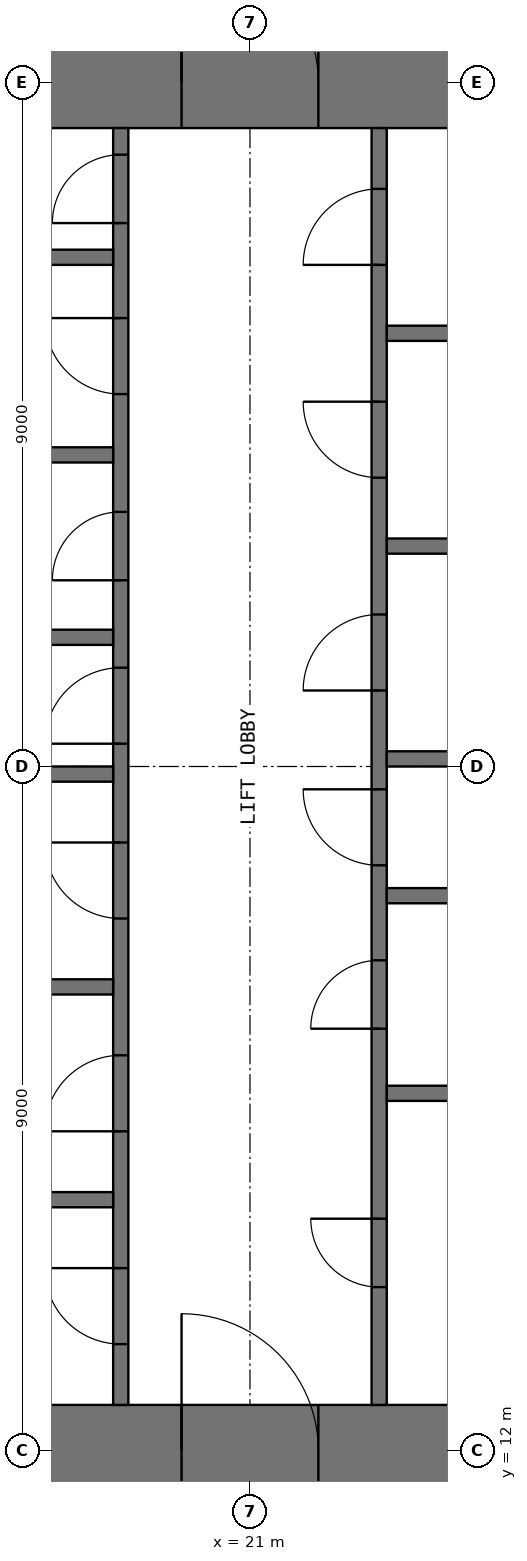
"""IFC4 building model, lengths in metres.
Left out: names, types, materials, properties, quantities, classifications, styles, units other than length and angle.
Written with IfcOpenShell. Run it as: python <this file> out.ifc"""

import sys

from ifc_helpers import new_model, si_unit, direction, frame, frame_2d, origin, place, context, subcontext, project, spatial, rectangle, extrude, element, fill, save


model = new_model("IFC4")
c1 = context("Model", 3, precision=1e-05, world=origin(), true_north=direction((0.0, 1.0)))
c2 = subcontext(c1, "Body", "Model", "MODEL_VIEW")
j1 = project(units=[si_unit("LENGTHUNIT", "METRE"), si_unit("PLANEANGLEUNIT", "RADIAN")], contexts=[c1])
p1 = place(None, origin())
s1 = spatial("IfcSite", under=j1, at=p1, CompositionType="ELEMENT")
p2 = place(p1, origin())
s2 = spatial("IfcBuilding", under=s1, at=p2, CompositionType="ELEMENT")
p3 = place(p2, frame((0.0, 0.0, 283.9)))
s3 = spatial("IfcBuildingStorey", under=s2, at=p3, CompositionType="ELEMENT", Elevation=283.9)
p4 = place(p3, frame((11.4, 12.0, -0.1), z_axis=(0.0, 0.0, 1.0), x_axis=(1.0, 0.0, 0.0)))
e1 = element("IfcWall", 1, at=p4, inside=s3, PredefinedType="SHEAR", context=c2, shape_type="SweptSolid", body=[
    extrude(rectangle(XDim=19.2, YDim=1.2, at=frame_2d((9.6, 0.0))), origin(), (0.0, 0.0, 1.0), 5.95),
])
p5 = place(p4, frame((8.7, 0.0, 0.1)))
e2 = element("IfcOpeningElement", 2, at=p5, cuts=e1, PredefinedType="OPENING", context=c2, shape_type="SweptSolid", body=[
    extrude(rectangle(XDim=1.8, YDim=2.4, at=frame_2d((0.9, 1.2))), frame((0.0, 0.61, 0.0), z_axis=(0.0, -1.0, 0.0), x_axis=(1.0, 0.0, 0.0)), (0.0, 0.0, 1.0), 1.22),
])
p6 = place(p3, frame((11.4, 30.0, -0.1), z_axis=(0.0, 0.0, 1.0), x_axis=(1.0, 0.0, 0.0)))
e3 = element("IfcWall", 3, at=p6, inside=s3, PredefinedType="SHEAR", context=c2, shape_type="SweptSolid", body=[
    extrude(rectangle(XDim=19.2, YDim=1.2, at=frame_2d((9.6, 0.0))), origin(), (0.0, 0.0, 1.0), 5.95),
])
p7 = place(p6, frame((8.7, 0.0, 0.1)))
e4 = element("IfcOpeningElement", 4, at=p7, cuts=e3, PredefinedType="OPENING", context=c2, shape_type="SweptSolid", body=[
    extrude(rectangle(XDim=1.8, YDim=2.4, at=frame_2d((0.9, 1.2))), frame((0.0, 0.61, 0.0), z_axis=(0.0, -1.0, 0.0), x_axis=(1.0, 0.0, 0.0)), (0.0, 0.0, 1.0), 1.22),
])
p8 = place(p3, frame((19.3, 12.6, -0.1), z_axis=(0.0, 0.0, 1.0), x_axis=(0.0, 1.0, 0.0)))
e5 = element("IfcWall", 5, at=p8, inside=s3, PredefinedType="SHEAR", context=c2, shape_type="SweptSolid", body=[
    extrude(rectangle(XDim=16.8, YDim=0.2, at=frame_2d((8.4, 0.0))), origin(), (0.0, 0.0, 1.0), 5.95),
])
p9 = place(p8, frame((8.7, 0.0, 0.1)))
e6 = element("IfcOpeningElement", 6, at=p9, cuts=e5, PredefinedType="OPENING", context=c2, shape_type="SweptSolid", body=[
    extrude(rectangle(XDim=1.0, YDim=2.2, at=frame_2d((0.5, 1.1))), frame((0.0, 0.11, 0.0), z_axis=(0.0, -1.0, 0.0), x_axis=(1.0, 0.0, 0.0)), (0.0, 0.0, 1.0), 0.22),
])
p10 = place(p8, frame((10.85, 0.0, 0.1)))
e7 = element("IfcOpeningElement", 7, at=p10, cuts=e5, PredefinedType="OPENING", context=c2, shape_type="SweptSolid", body=[
    extrude(rectangle(XDim=0.9, YDim=2.2, at=frame_2d((0.45, 1.1))), frame((0.0, 0.11, 0.0), z_axis=(0.0, -1.0, 0.0), x_axis=(1.0, 0.0, 0.0)), (0.0, 0.0, 1.0), 0.22),
])
p11 = place(p8, frame((13.3, 0.0, 0.1)))
e8 = element("IfcOpeningElement", 8, at=p11, cuts=e5, PredefinedType="OPENING", context=c2, shape_type="SweptSolid", body=[
    extrude(rectangle(XDim=1.0, YDim=2.2, at=frame_2d((0.5, 1.1))), frame((0.0, 0.11, 0.0), z_axis=(0.0, -1.0, 0.0), x_axis=(1.0, 0.0, 0.0)), (0.0, 0.0, 1.0), 0.22),
])
p12 = place(p8, frame((15.55, 0.0, 0.1)))
e9 = element("IfcOpeningElement", 9, at=p12, cuts=e5, PredefinedType="OPENING", context=c2, shape_type="SweptSolid", body=[
    extrude(rectangle(XDim=0.9, YDim=2.2, at=frame_2d((0.45, 1.1))), frame((0.0, 0.11, 0.0), z_axis=(0.0, -1.0, 0.0), x_axis=(1.0, 0.0, 0.0)), (0.0, 0.0, 1.0), 0.22),
])
p13 = place(p8, frame((0.8, 0.0, 0.1)))
e10 = element("IfcOpeningElement", 10, at=p13, cuts=e5, PredefinedType="OPENING", context=c2, shape_type="SweptSolid", body=[
    extrude(rectangle(XDim=1.0, YDim=2.2, at=frame_2d((0.5, 1.1))), frame((0.0, 0.11, 0.0), z_axis=(0.0, -1.0, 0.0), x_axis=(1.0, 0.0, 0.0)), (0.0, 0.0, 1.0), 0.22),
])
p14 = place(p8, frame((3.6, 0.0, 0.1)))
e11 = element("IfcOpeningElement", 11, at=p14, cuts=e5, PredefinedType="OPENING", context=c2, shape_type="SweptSolid", body=[
    extrude(rectangle(XDim=1.0, YDim=2.2, at=frame_2d((0.5, 1.1))), frame((0.0, 0.11, 0.0), z_axis=(0.0, -1.0, 0.0), x_axis=(1.0, 0.0, 0.0)), (0.0, 0.0, 1.0), 0.22),
])
p15 = place(p8, frame((6.4, 0.0, 0.1)))
e12 = element("IfcOpeningElement", 12, at=p15, cuts=e5, PredefinedType="OPENING", context=c2, shape_type="SweptSolid", body=[
    extrude(rectangle(XDim=1.0, YDim=2.2, at=frame_2d((0.5, 1.1))), frame((0.0, 0.11, 0.0), z_axis=(0.0, -1.0, 0.0), x_axis=(1.0, 0.0, 0.0)), (0.0, 0.0, 1.0), 0.22),
])
p16 = place(p3, frame((22.7, 12.6, -0.1), z_axis=(0.0, 0.0, 1.0), x_axis=(0.0, 1.0, 0.0)))
e13 = element("IfcWall", 13, at=p16, inside=s3, PredefinedType="SHEAR", context=c2, shape_type="SweptSolid", body=[
    extrude(rectangle(XDim=16.8, YDim=0.2, at=frame_2d((8.4, 0.0))), origin(), (0.0, 0.0, 1.0), 5.95),
])
p17 = place(p16, frame((7.1, 0.0, 0.1)))
e14 = element("IfcOpeningElement", 14, at=p17, cuts=e13, PredefinedType="OPENING", context=c2, shape_type="SweptSolid", body=[
    extrude(rectangle(XDim=1.0, YDim=2.2, at=frame_2d((0.5, 1.1))), frame((0.0, 0.11, 0.0), z_axis=(0.0, -1.0, 0.0), x_axis=(1.0, 0.0, 0.0)), (0.0, 0.0, 1.0), 0.22),
])
p18 = place(p16, frame((1.55, 0.0, 0.1)))
e15 = element("IfcOpeningElement", 15, at=p18, cuts=e13, PredefinedType="OPENING", context=c2, shape_type="SweptSolid", body=[
    extrude(rectangle(XDim=0.9, YDim=2.2, at=frame_2d((0.45, 1.1))), frame((0.0, 0.11, 0.0), z_axis=(0.0, -1.0, 0.0), x_axis=(1.0, 0.0, 0.0)), (0.0, 0.0, 1.0), 0.22),
])
p19 = place(p16, frame((4.95, 0.0, 0.1)))
e16 = element("IfcOpeningElement", 16, at=p19, cuts=e13, PredefinedType="OPENING", context=c2, shape_type="SweptSolid", body=[
    extrude(rectangle(XDim=0.9, YDim=2.2, at=frame_2d((0.45, 1.1))), frame((0.0, 0.11, 0.0), z_axis=(0.0, -1.0, 0.0), x_axis=(1.0, 0.0, 0.0)), (0.0, 0.0, 1.0), 0.22),
])
p20 = place(p16, frame((9.4, 0.0, 0.1)))
e17 = element("IfcOpeningElement", 17, at=p20, cuts=e13, PredefinedType="OPENING", context=c2, shape_type="SweptSolid", body=[
    extrude(rectangle(XDim=1.0, YDim=2.2, at=frame_2d((0.5, 1.1))), frame((0.0, 0.11, 0.0), z_axis=(0.0, -1.0, 0.0), x_axis=(1.0, 0.0, 0.0)), (0.0, 0.0, 1.0), 0.22),
])
p21 = place(p16, frame((12.2, 0.0, 0.1)))
e18 = element("IfcOpeningElement", 18, at=p21, cuts=e13, PredefinedType="OPENING", context=c2, shape_type="SweptSolid", body=[
    extrude(rectangle(XDim=1.0, YDim=2.2, at=frame_2d((0.5, 1.1))), frame((0.0, 0.11, 0.0), z_axis=(0.0, -1.0, 0.0), x_axis=(1.0, 0.0, 0.0)), (0.0, 0.0, 1.0), 0.22),
])
p22 = place(p16, frame((15.0, 0.0, 0.1)))
e19 = element("IfcOpeningElement", 19, at=p22, cuts=e13, PredefinedType="OPENING", context=c2, shape_type="SweptSolid", body=[
    extrude(rectangle(XDim=1.0, YDim=2.2, at=frame_2d((0.5, 1.1))), frame((0.0, 0.11, 0.0), z_axis=(0.0, -1.0, 0.0), x_axis=(1.0, 0.0, 0.0)), (0.0, 0.0, 1.0), 0.22),
])
for number, where, z_axis, x_axis in (
    (20, (16.0, 15.3, -0.1), (0.0, 0.0, 1.0), (1.0, 0.0, 0.0)),
    (21, (16.0, 18.1, -0.1), (0.0, 0.0, 1.0), (1.0, 0.0, 0.0)),
    (22, (16.0, 20.9, -0.1), (0.0, 0.0, 1.0), (1.0, 0.0, 0.0)),
    (23, (16.0, 22.7, -0.1), (0.0, 0.0, 1.0), (1.0, 0.0, 0.0)),
    (24, (16.0, 25.1, -0.1), (0.0, 0.0, 1.0), (1.0, 0.0, 0.0)),
    (25, (16.0, 27.7, -0.1), (0.0, 0.0, 1.0), (1.0, 0.0, 0.0)),
    (26, (22.8, 16.7, -0.1), (0.0, 0.0, 1.0), (1.0, 0.0, 0.0)),
    (27, (22.8, 19.3, -0.1), (0.0, 0.0, 1.0), (1.0, 0.0, 0.0)),
    (28, (22.8, 21.1, -0.1), (0.0, 0.0, 1.0), (1.0, 0.0, 0.0)),
    (29, (22.8, 23.9, -0.1), (0.0, 0.0, 1.0), (1.0, 0.0, 0.0)),
    (30, (22.8, 26.7, -0.1), (0.0, 0.0, 1.0), (1.0, 0.0, 0.0)),
):
    element("IfcWall", number, at=place(p3, frame(where, z_axis=z_axis, x_axis=x_axis)), inside=s3, PredefinedType="SHEAR", context=c2, shape_type="SweptSolid", body=[
        extrude(rectangle(XDim=3.2, YDim=0.2, at=frame_2d((1.6, 0.0))), origin(), (0.0, 0.0, 1.0), 5.95),
    ])
p23 = place(p5, origin())
e31 = element("IfcDoor", 31, at=p23, inside=s3, OperationType="DOUBLE_DOOR_SINGLE_SWING", PredefinedType="DOOR", context=c2, shape_type="SweptSolid", body=[
    extrude(rectangle(XDim=1.8, YDim=2.4, at=frame_2d((0.9, 1.2))), frame((0.0, -0.275, 0.0), z_axis=(0.0, -1.0, 0.0), x_axis=(1.0, 0.0, 0.0)), (0.0, 0.0, 1.0), 0.05),
])
fill(e2, e31)
p24 = place(p7, origin())
e32 = element("IfcDoor", 32, at=p24, inside=s3, OperationType="DOUBLE_DOOR_SINGLE_SWING", PredefinedType="DOOR", context=c2, shape_type="SweptSolid", body=[
    extrude(rectangle(XDim=1.8, YDim=2.4, at=frame_2d((0.9, 1.2))), frame((0.0, 0.325, 0.0), z_axis=(0.0, -1.0, 0.0), x_axis=(1.0, 0.0, 0.0)), (0.0, 0.0, 1.0), 0.05),
])
fill(e4, e32)
p25 = place(p9, origin())
e33 = element("IfcDoor", 33, at=p25, inside=s3, OperationType="SINGLE_SWING_LEFT", PredefinedType="DOOR", context=c2, shape_type="SweptSolid", body=[
    extrude(rectangle(XDim=1.0, YDim=2.2, at=frame_2d((0.5, 1.1))), frame((0.0, 0.025, 0.0), z_axis=(0.0, -1.0, 0.0), x_axis=(1.0, 0.0, 0.0)), (0.0, 0.0, 1.0), 0.05),
])
fill(e6, e33)
p26 = place(p17, origin())
e34 = element("IfcDoor", 34, at=p26, inside=s3, OperationType="SINGLE_SWING_RIGHT", PredefinedType="DOOR", context=c2, shape_type="SweptSolid", body=[
    extrude(rectangle(XDim=1.0, YDim=2.2, at=frame_2d((0.5, 1.1))), frame((0.0, 0.025, 0.0), z_axis=(0.0, -1.0, 0.0), x_axis=(1.0, 0.0, 0.0)), (0.0, 0.0, 1.0), 0.05),
])
fill(e14, e34)
p27 = place(p10, origin())
e35 = element("IfcDoor", 35, at=p27, inside=s3, OperationType="SINGLE_SWING_LEFT", PredefinedType="DOOR", context=c2, shape_type="SweptSolid", body=[
    extrude(rectangle(XDim=0.9, YDim=2.2, at=frame_2d((0.45, 1.1))), frame((0.0, 0.025, 0.0), z_axis=(0.0, -1.0, 0.0), x_axis=(1.0, 0.0, 0.0)), (0.0, 0.0, 1.0), 0.05),
])
fill(e7, e35)
p28 = place(p11, origin())
e36 = element("IfcDoor", 36, at=p28, inside=s3, OperationType="SINGLE_SWING_RIGHT", PredefinedType="DOOR", context=c2, shape_type="SweptSolid", body=[
    extrude(rectangle(XDim=1.0, YDim=2.2, at=frame_2d((0.5, 1.1))), frame((0.0, 0.025, 0.0), z_axis=(0.0, -1.0, 0.0), x_axis=(1.0, 0.0, 0.0)), (0.0, 0.0, 1.0), 0.05),
])
fill(e8, e36)
p29 = place(p12, origin())
e37 = element("IfcDoor", 37, at=p29, inside=s3, OperationType="SINGLE_SWING_LEFT", PredefinedType="DOOR", context=c2, shape_type="SweptSolid", body=[
    extrude(rectangle(XDim=0.9, YDim=2.2, at=frame_2d((0.45, 1.1))), frame((0.0, 0.025, 0.0), z_axis=(0.0, -1.0, 0.0), x_axis=(1.0, 0.0, 0.0)), (0.0, 0.0, 1.0), 0.05),
])
fill(e9, e37)
p30 = place(p18, origin())
e38 = element("IfcDoor", 38, at=p30, inside=s3, OperationType="SINGLE_SWING_RIGHT", PredefinedType="DOOR", context=c2, shape_type="SweptSolid", body=[
    extrude(rectangle(XDim=0.9, YDim=2.2, at=frame_2d((0.45, 1.1))), frame((0.0, 0.025, 0.0), z_axis=(0.0, -1.0, 0.0), x_axis=(1.0, 0.0, 0.0)), (0.0, 0.0, 1.0), 0.05),
])
fill(e15, e38)
p31 = place(p19, origin())
e39 = element("IfcDoor", 39, at=p31, inside=s3, OperationType="SINGLE_SWING_LEFT", PredefinedType="DOOR", context=c2, shape_type="SweptSolid", body=[
    extrude(rectangle(XDim=0.9, YDim=2.2, at=frame_2d((0.45, 1.1))), frame((0.0, 0.025, 0.0), z_axis=(0.0, -1.0, 0.0), x_axis=(1.0, 0.0, 0.0)), (0.0, 0.0, 1.0), 0.05),
])
fill(e16, e39)
p32 = place(p13, origin())
e40 = element("IfcDoor", 40, at=p32, inside=s3, OperationType="SINGLE_SWING_RIGHT", PredefinedType="DOOR", context=c2, shape_type="SweptSolid", body=[
    extrude(rectangle(XDim=1.0, YDim=2.2, at=frame_2d((0.5, 1.1))), frame((0.0, 0.025, 0.0), z_axis=(0.0, -1.0, 0.0), x_axis=(1.0, 0.0, 0.0)), (0.0, 0.0, 1.0), 0.05),
])
fill(e10, e40)
p33 = place(p14, origin())
e41 = element("IfcDoor", 41, at=p33, inside=s3, OperationType="SINGLE_SWING_LEFT", PredefinedType="DOOR", context=c2, shape_type="SweptSolid", body=[
    extrude(rectangle(XDim=1.0, YDim=2.2, at=frame_2d((0.5, 1.1))), frame((0.0, 0.025, 0.0), z_axis=(0.0, -1.0, 0.0), x_axis=(1.0, 0.0, 0.0)), (0.0, 0.0, 1.0), 0.05),
])
fill(e11, e41)
p34 = place(p15, origin())
e42 = element("IfcDoor", 42, at=p34, inside=s3, OperationType="SINGLE_SWING_RIGHT", PredefinedType="DOOR", context=c2, shape_type="SweptSolid", body=[
    extrude(rectangle(XDim=1.0, YDim=2.2, at=frame_2d((0.5, 1.1))), frame((0.0, 0.025, 0.0), z_axis=(0.0, -1.0, 0.0), x_axis=(1.0, 0.0, 0.0)), (0.0, 0.0, 1.0), 0.05),
])
fill(e12, e42)
p35 = place(p20, origin())
e43 = element("IfcDoor", 43, at=p35, inside=s3, OperationType="SINGLE_SWING_LEFT", PredefinedType="DOOR", context=c2, shape_type="SweptSolid", body=[
    extrude(rectangle(XDim=1.0, YDim=2.2, at=frame_2d((0.5, 1.1))), frame((0.0, 0.025, 0.0), z_axis=(0.0, -1.0, 0.0), x_axis=(1.0, 0.0, 0.0)), (0.0, 0.0, 1.0), 0.05),
])
fill(e17, e43)
p36 = place(p21, origin())
e44 = element("IfcDoor", 44, at=p36, inside=s3, OperationType="SINGLE_SWING_RIGHT", PredefinedType="DOOR", context=c2, shape_type="SweptSolid", body=[
    extrude(rectangle(XDim=1.0, YDim=2.2, at=frame_2d((0.5, 1.1))), frame((0.0, 0.025, 0.0), z_axis=(0.0, -1.0, 0.0), x_axis=(1.0, 0.0, 0.0)), (0.0, 0.0, 1.0), 0.05),
])
fill(e18, e44)
p37 = place(p22, origin())
e45 = element("IfcDoor", 45, at=p37, inside=s3, OperationType="SINGLE_SWING_LEFT", PredefinedType="DOOR", context=c2, shape_type="SweptSolid", body=[
    extrude(rectangle(XDim=1.0, YDim=2.2, at=frame_2d((0.5, 1.1))), frame((0.0, 0.025, 0.0), z_axis=(0.0, -1.0, 0.0), x_axis=(1.0, 0.0, 0.0)), (0.0, 0.0, 1.0), 0.05),
])
fill(e19, e45)
save(model, sys.argv[1])
